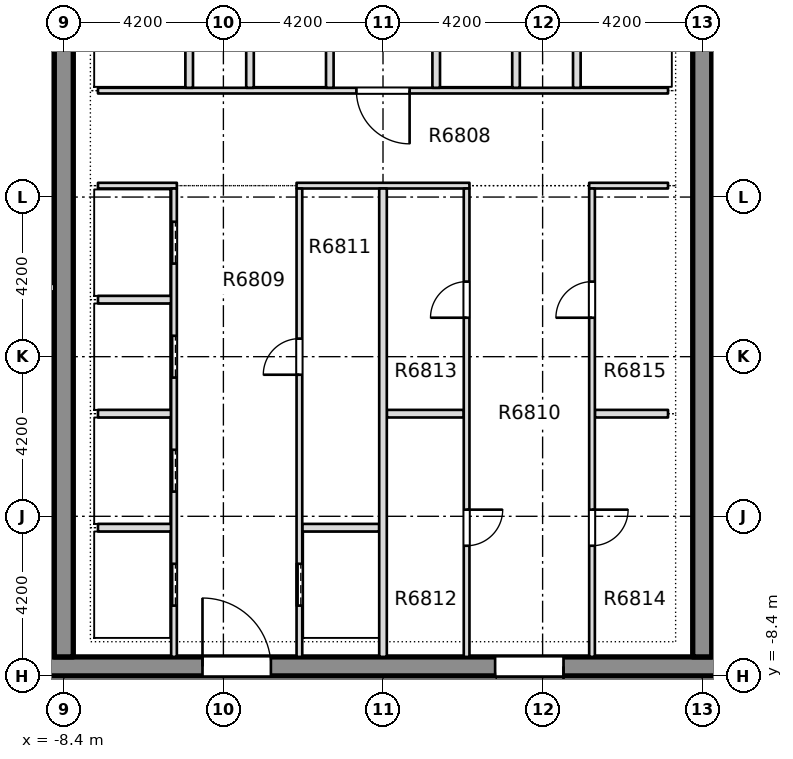
"""IFC4 building model, lengths in metres.
Left out: names, types, materials, properties, quantities, classifications, styles, units other than length and angle.
Written with IfcOpenShell. Run it as: python <this file> out.ifc"""

import sys

from ifc_helpers import new_model, si_unit, direction, frame, frame_2d, origin, place, context, subcontext, project, spatial, rectangle, extrude, element, fill, save


model = new_model("IFC4")
c1 = context("Model", 3, precision=1e-05, world=origin(), true_north=direction((0.0, 1.0)))
c2 = subcontext(c1, "Body", "Model", "MODEL_VIEW")
j1 = project(units=[si_unit("LENGTHUNIT", "METRE"), si_unit("PLANEANGLEUNIT", "RADIAN")], contexts=[c1])
p1 = place(None, origin())
s1 = spatial("IfcSite", under=j1, at=p1, CompositionType="ELEMENT")
p2 = place(p1, origin())
s2 = spatial("IfcBuilding", under=s1, at=p2, CompositionType="ELEMENT")
p3 = place(p2, frame((0.0, 0.0, 257.95)))
s3 = spatial("IfcBuildingStorey", under=s2, at=p3, CompositionType="ELEMENT", Elevation=257.95)
p4 = place(p3, frame((-12.1, -8.15, -0.4), z_axis=(0.0, 0.0, 1.0), x_axis=(1.0, 0.0, 0.0)))
e1 = element("IfcWall", 1, at=p4, inside=s3, PredefinedType="SHEAR", context=c2, shape_type="SweptSolid", body=[
    extrude(rectangle(XDim=24.2, YDim=0.5, at=frame_2d((12.1, 0.0))), origin(), (0.0, 0.0, 1.0), 3.45),
])
p5 = place(p4, frame((7.35, 0.0, 0.4)))
e2 = element("IfcOpeningElement", 2, at=p5, cuts=e1, PredefinedType="OPENING", context=c2, shape_type="SweptSolid", body=[
    extrude(rectangle(XDim=1.8, YDim=2.1, at=frame_2d((0.9, 1.05))), frame((0.0, 0.26, 0.0), z_axis=(0.0, -1.0, 0.0), x_axis=(1.0, 0.0, 0.0)), (0.0, 0.0, 1.0), 0.52),
])
p6 = place(p4, frame((15.05, 0.0, 0.4)))
e3 = element("IfcOpeningElement", 3, at=p6, cuts=e1, PredefinedType="OPENING", context=c2, shape_type="SweptSolid", body=[
    extrude(rectangle(XDim=1.8, YDim=2.1, at=frame_2d((0.9, 1.05))), frame((0.0, 0.26, 0.0), z_axis=(0.0, -1.0, 0.0), x_axis=(1.0, 0.0, 0.0)), (0.0, 0.0, 1.0), 0.52),
])
p7 = place(p3, frame((-8.4, -7.9, -0.4), z_axis=(0.0, 0.0, 1.0), x_axis=(0.0, 1.0, 0.0)))
e4 = element("IfcWall", 4, at=p7, inside=s3, PredefinedType="SHEAR", context=c2, shape_type="SweptSolid", body=[
    extrude(rectangle(XDim=29.15, YDim=0.5, at=frame_2d((14.575, 0.0))), origin(), (0.0, 0.0, 1.0), 3.45),
])
p8 = place(p7, frame((18.8, 0.0, 0.4)))
e5 = element("IfcOpeningElement", 5, at=p8, cuts=e4, PredefinedType="OPENING", context=c2, shape_type="SweptSolid", body=[
    extrude(rectangle(XDim=1.2, YDim=2.1, at=frame_2d((0.6, 1.05))), frame((0.0, 0.26, 0.0), z_axis=(0.0, -1.0, 0.0), x_axis=(1.0, 0.0, 0.0)), (0.0, 0.0, 1.0), 0.52),
])
p9 = place(p3, frame((8.4, -7.9, -0.4), z_axis=(0.0, 0.0, 1.0), x_axis=(0.0, 1.0, 0.0)))
e6 = element("IfcWall", 6, at=p9, inside=s3, PredefinedType="SHEAR", context=c2, shape_type="SweptSolid", body=[
    extrude(rectangle(XDim=29.15, YDim=0.5, at=frame_2d((14.575, 0.0))), origin(), (0.0, 0.0, 1.0), 3.45),
])
p10 = place(p9, frame((18.8, 0.0, 0.4)))
e7 = element("IfcOpeningElement", 7, at=p10, cuts=e6, PredefinedType="OPENING", context=c2, shape_type="SweptSolid", body=[
    extrude(rectangle(XDim=1.2, YDim=2.1, at=frame_2d((0.6, 1.05))), frame((0.0, 0.26, 0.0), z_axis=(0.0, -1.0, 0.0), x_axis=(1.0, 0.0, 0.0)), (0.0, 0.0, 1.0), 0.52),
])
p11 = place(p3, frame((-7.5, -4.5, 0.0), z_axis=(0.0, 0.0, 1.0), x_axis=(1.0, 0.0, 0.0)))
e8 = element("IfcWall", 8, at=p11, inside=s3, PredefinedType="PARTITIONING", context=c2, shape_type="SweptSolid", body=[
    extrude(rectangle(XDim=1.925, YDim=0.2, at=frame_2d((0.962, 0.0))), origin(), (0.0, 0.0, 1.0), 3.05),
])
p12 = place(p3, frame((-2.125, -4.5, 0.0), z_axis=(0.0, 0.0, 1.0), x_axis=(1.0, 0.0, 0.0)))
e9 = element("IfcWall", 9, at=p12, inside=s3, PredefinedType="PARTITIONING", context=c2, shape_type="SweptSolid", body=[
    extrude(rectangle(XDim=2.025, YDim=0.2, at=frame_2d((1.012, 0.0))), origin(), (0.0, 0.0, 1.0), 3.05),
])
p13 = place(p3, frame((-7.5, -1.5, 0.0), z_axis=(0.0, 0.0, 1.0), x_axis=(1.0, 0.0, 0.0)))
e10 = element("IfcWall", 10, at=p13, inside=s3, PredefinedType="PARTITIONING", context=c2, shape_type="SweptSolid", body=[
    extrude(rectangle(XDim=1.925, YDim=0.2, at=frame_2d((0.962, 0.0))), origin(), (0.0, 0.0, 1.0), 3.05),
])
p14 = place(p3, frame((0.1, -1.5, 0.0), z_axis=(0.0, 0.0, 1.0), x_axis=(1.0, 0.0, 0.0)))
e11 = element("IfcWall", 11, at=p14, inside=s3, PredefinedType="PARTITIONING", context=c2, shape_type="SweptSolid", body=[
    extrude(rectangle(XDim=2.025, YDim=0.2, at=frame_2d((1.012, 0.0))), origin(), (0.0, 0.0, 1.0), 3.05),
])
for number, where, z_axis, x_axis in (
    (12, (5.575, -1.5, 0.0), (0.0, 0.0, 1.0), (1.0, 0.0, 0.0)),
    (13, (-7.5, 1.5, 0.0), (0.0, 0.0, 1.0), (1.0, 0.0, 0.0)),
):
    element("IfcWall", number, at=place(p3, frame(where, z_axis=z_axis, x_axis=x_axis)), inside=s3, PredefinedType="PARTITIONING", context=c2, shape_type="SweptSolid", body=[
        extrude(rectangle(XDim=1.925, YDim=0.2, at=frame_2d((0.962, 0.0))), origin(), (0.0, 0.0, 1.0), 3.05),
    ])
p15 = place(p3, frame((-7.5, 4.5, 0.0), z_axis=(0.0, 0.0, 1.0), x_axis=(1.0, 0.0, 0.0)))
e14 = element("IfcWall", 14, at=p15, inside=s3, PredefinedType="PARTITIONING", context=c2, shape_type="SweptSolid", body=[
    extrude(rectangle(XDim=2.075, YDim=0.15, at=frame_2d((1.038, 0.0))), origin(), (0.0, 0.0, 1.0), 3.05),
])
p16 = place(p3, frame((-2.275, 4.5, 0.0), z_axis=(0.0, 0.0, 1.0), x_axis=(1.0, 0.0, 0.0)))
e15 = element("IfcWall", 15, at=p16, inside=s3, PredefinedType="PARTITIONING", context=c2, shape_type="SweptSolid", body=[
    extrude(rectangle(XDim=4.55, YDim=0.15, at=frame_2d((2.275, 0.0))), origin(), (0.0, 0.0, 1.0), 3.05),
])
p17 = place(p3, frame((5.425, 4.5, 0.0), z_axis=(0.0, 0.0, 1.0), x_axis=(1.0, 0.0, 0.0)))
e16 = element("IfcWall", 16, at=p17, inside=s3, PredefinedType="PARTITIONING", context=c2, shape_type="SweptSolid", body=[
    extrude(rectangle(XDim=2.075, YDim=0.15, at=frame_2d((1.038, 0.0))), origin(), (0.0, 0.0, 1.0), 3.05),
])
p18 = place(p3, frame((-7.5, 7.0, 0.0), z_axis=(0.0, 0.0, 1.0), x_axis=(1.0, 0.0, 0.0)))
e17 = element("IfcWall", 17, at=p18, inside=s3, PredefinedType="PARTITIONING", context=c2, shape_type="SweptSolid", body=[
    extrude(rectangle(XDim=15.0, YDim=0.15, at=frame_2d((7.5, 0.0))), origin(), (0.0, 0.0, 1.0), 3.05),
])
p19 = place(p18, frame((6.8, 0.0, 0.0)))
e18 = element("IfcOpeningElement", 18, at=p19, cuts=e17, PredefinedType="OPENING", context=c2, shape_type="SweptSolid", body=[
    extrude(rectangle(XDim=1.4, YDim=2.1, at=frame_2d((0.7, 1.05))), frame((0.0, 0.085, 0.0), z_axis=(0.0, -1.0, 0.0), x_axis=(1.0, 0.0, 0.0)), (0.0, 0.0, 1.0), 0.17),
])
p20 = place(p3, frame((-5.5, -7.899, 0.0), z_axis=(0.0, 0.0, 1.0), x_axis=(0.0, 1.0, 0.0)))
e19 = element("IfcWall", 19, at=p20, inside=s3, PredefinedType="PARTITIONING", context=c2, shape_type="SweptSolid", body=[
    extrude(rectangle(XDim=12.324, YDim=0.15, at=frame_2d((6.162, 0.0))), origin(), (0.0, 0.0, 1.0), 3.05),
])
p21 = place(p20, frame((1.349, 0.0, 0.0)))
e20 = element("IfcOpeningElement", 20, at=p21, cuts=e19, PredefinedType="OPENING", context=c2, shape_type="SweptSolid", body=[
    extrude(rectangle(XDim=1.1, YDim=2.1, at=frame_2d((0.55, 1.05))), frame((0.0, 0.085, 0.0), z_axis=(0.0, -1.0, 0.0), x_axis=(1.0, 0.0, 0.0)), (0.0, 0.0, 1.0), 0.17),
])
p22 = place(p20, frame((4.349, 0.0, 0.0)))
e21 = element("IfcOpeningElement", 21, at=p22, cuts=e19, PredefinedType="OPENING", context=c2, shape_type="SweptSolid", body=[
    extrude(rectangle(XDim=1.1, YDim=2.1, at=frame_2d((0.55, 1.05))), frame((0.0, 0.085, 0.0), z_axis=(0.0, -1.0, 0.0), x_axis=(1.0, 0.0, 0.0)), (0.0, 0.0, 1.0), 0.17),
])
p23 = place(p20, frame((7.349, 0.0, 0.0)))
e22 = element("IfcOpeningElement", 22, at=p23, cuts=e19, PredefinedType="OPENING", context=c2, shape_type="SweptSolid", body=[
    extrude(rectangle(XDim=1.1, YDim=2.1, at=frame_2d((0.55, 1.05))), frame((0.0, 0.085, 0.0), z_axis=(0.0, -1.0, 0.0), x_axis=(1.0, 0.0, 0.0)), (0.0, 0.0, 1.0), 0.17),
])
p24 = place(p20, frame((10.349, 0.0, 0.0)))
e23 = element("IfcOpeningElement", 23, at=p24, cuts=e19, PredefinedType="OPENING", context=c2, shape_type="SweptSolid", body=[
    extrude(rectangle(XDim=1.1, YDim=2.1, at=frame_2d((0.55, 1.05))), frame((0.0, 0.085, 0.0), z_axis=(0.0, -1.0, 0.0), x_axis=(1.0, 0.0, 0.0)), (0.0, 0.0, 1.0), 0.17),
])
p25 = place(p3, frame((-5.1, 7.075, 0.0), z_axis=(0.0, 0.0, 1.0), x_axis=(0.0, 1.0, 0.0)))
e24 = element("IfcWall", 24, at=p25, inside=s3, PredefinedType="PARTITIONING", context=c2, shape_type="SweptSolid", body=[
    extrude(rectangle(XDim=2.725, YDim=0.2, at=frame_2d((1.363, 0.0))), origin(), (0.0, 0.0, 1.0), 3.05),
])
p26 = place(p3, frame((-3.5, 7.075, 0.0), z_axis=(0.0, 0.0, 1.0), x_axis=(0.0, 1.0, 0.0)))
e25 = element("IfcWall", 25, at=p26, inside=s3, PredefinedType="PARTITIONING", context=c2, shape_type="SweptSolid", body=[
    extrude(rectangle(XDim=2.85, YDim=0.2, at=frame_2d((1.425, 0.0))), origin(), (0.0, 0.0, 1.0), 3.05),
])
p27 = place(p3, frame((-2.2, -7.899, 0.0), z_axis=(0.0, 0.0, 1.0), x_axis=(0.0, 1.0, 0.0)))
e26 = element("IfcWall", 26, at=p27, inside=s3, PredefinedType="PARTITIONING", context=c2, shape_type="SweptSolid", body=[
    extrude(rectangle(XDim=12.324, YDim=0.15, at=frame_2d((6.162, 0.0))), origin(), (0.0, 0.0, 1.0), 3.05),
])
p28 = place(p27, frame((1.349, 0.0, 0.0)))
e27 = element("IfcOpeningElement", 27, at=p28, cuts=e26, PredefinedType="OPENING", context=c2, shape_type="SweptSolid", body=[
    extrude(rectangle(XDim=1.1, YDim=2.1, at=frame_2d((0.55, 1.05))), frame((0.0, 0.085, 0.0), z_axis=(0.0, -1.0, 0.0), x_axis=(1.0, 0.0, 0.0)), (0.0, 0.0, 1.0), 0.17),
])
p29 = place(p27, frame((7.424, 0.0, 0.0)))
e28 = element("IfcOpeningElement", 28, at=p29, cuts=e26, PredefinedType="OPENING", context=c2, shape_type="SweptSolid", body=[
    extrude(rectangle(XDim=0.95, YDim=2.1, at=frame_2d((0.475, 1.05))), frame((0.0, 0.085, 0.0), z_axis=(0.0, -1.0, 0.0), x_axis=(1.0, 0.0, 0.0)), (0.0, 0.0, 1.0), 0.17),
])
p30 = place(p3, frame((-1.4, 7.075, 0.0), z_axis=(0.0, 0.0, 1.0), x_axis=(0.0, 1.0, 0.0)))
e29 = element("IfcWall", 29, at=p30, inside=s3, PredefinedType="PARTITIONING", context=c2, shape_type="SweptSolid", body=[
    extrude(rectangle(XDim=2.85, YDim=0.2, at=frame_2d((1.425, 0.0))), origin(), (0.0, 0.0, 1.0), 3.05),
])
p31 = place(p3, frame((0.0, -7.899, 0.0), z_axis=(0.0, 0.0, 1.0), x_axis=(0.0, 1.0, 0.0)))
e30 = element("IfcWall", 30, at=p31, inside=s3, PredefinedType="PARTITIONING", context=c2, shape_type="SweptSolid", body=[
    extrude(rectangle(XDim=12.324, YDim=0.2, at=frame_2d((6.162, 0.0))), origin(), (0.0, 0.0, 1.0), 3.05),
])
p32 = place(p3, frame((1.4, 7.075, 0.0), z_axis=(0.0, 0.0, 1.0), x_axis=(0.0, 1.0, 0.0)))
e31 = element("IfcWall", 31, at=p32, inside=s3, PredefinedType="PARTITIONING", context=c2, shape_type="SweptSolid", body=[
    extrude(rectangle(XDim=2.85, YDim=0.2, at=frame_2d((1.425, 0.0))), origin(), (0.0, 0.0, 1.0), 3.05),
])
p33 = place(p3, frame((2.2, -7.899, 0.0), z_axis=(0.0, 0.0, 1.0), x_axis=(0.0, 1.0, 0.0)))
e32 = element("IfcWall", 32, at=p33, inside=s3, PredefinedType="PARTITIONING", context=c2, shape_type="SweptSolid", body=[
    extrude(rectangle(XDim=12.324, YDim=0.15, at=frame_2d((6.162, 0.0))), origin(), (0.0, 0.0, 1.0), 3.05),
])
p34 = place(p33, frame((2.924, 0.0, 0.0)))
e33 = element("IfcOpeningElement", 33, at=p34, cuts=e32, PredefinedType="OPENING", context=c2, shape_type="SweptSolid", body=[
    extrude(rectangle(XDim=0.95, YDim=2.1, at=frame_2d((0.475, 1.05))), frame((0.0, 0.085, 0.0), z_axis=(0.0, -1.0, 0.0), x_axis=(1.0, 0.0, 0.0)), (0.0, 0.0, 1.0), 0.17),
])
p35 = place(p33, frame((8.924, 0.0, 0.0)))
e34 = element("IfcOpeningElement", 34, at=p35, cuts=e32, PredefinedType="OPENING", context=c2, shape_type="SweptSolid", body=[
    extrude(rectangle(XDim=0.95, YDim=2.1, at=frame_2d((0.475, 1.05))), frame((0.0, 0.085, 0.0), z_axis=(0.0, -1.0, 0.0), x_axis=(1.0, 0.0, 0.0)), (0.0, 0.0, 1.0), 0.17),
])
p36 = place(p3, frame((3.5, 7.075, 0.0), z_axis=(0.0, 0.0, 1.0), x_axis=(0.0, 1.0, 0.0)))
e35 = element("IfcWall", 35, at=p36, inside=s3, PredefinedType="PARTITIONING", context=c2, shape_type="SweptSolid", body=[
    extrude(rectangle(XDim=2.85, YDim=0.2, at=frame_2d((1.425, 0.0))), origin(), (0.0, 0.0, 1.0), 3.05),
])
p37 = place(p3, frame((5.1, 7.075, 0.0), z_axis=(0.0, 0.0, 1.0), x_axis=(0.0, 1.0, 0.0)))
e36 = element("IfcWall", 36, at=p37, inside=s3, PredefinedType="PARTITIONING", context=c2, shape_type="SweptSolid", body=[
    extrude(rectangle(XDim=2.725, YDim=0.2, at=frame_2d((1.363, 0.0))), origin(), (0.0, 0.0, 1.0), 3.05),
])
p38 = place(p3, frame((5.5, -7.899, 0.0), z_axis=(0.0, 0.0, 1.0), x_axis=(0.0, 1.0, 0.0)))
e37 = element("IfcWall", 37, at=p38, inside=s3, PredefinedType="PARTITIONING", context=c2, shape_type="SweptSolid", body=[
    extrude(rectangle(XDim=12.324, YDim=0.15, at=frame_2d((6.162, 0.0))), origin(), (0.0, 0.0, 1.0), 3.05),
])
p39 = place(p38, frame((2.924, 0.0, 0.0)))
e38 = element("IfcOpeningElement", 38, at=p39, cuts=e37, PredefinedType="OPENING", context=c2, shape_type="SweptSolid", body=[
    extrude(rectangle(XDim=0.95, YDim=2.1, at=frame_2d((0.475, 1.05))), frame((0.0, 0.085, 0.0), z_axis=(0.0, -1.0, 0.0), x_axis=(1.0, 0.0, 0.0)), (0.0, 0.0, 1.0), 0.17),
])
p40 = place(p38, frame((8.924, 0.0, 0.0)))
e39 = element("IfcOpeningElement", 39, at=p40, cuts=e37, PredefinedType="OPENING", context=c2, shape_type="SweptSolid", body=[
    extrude(rectangle(XDim=0.95, YDim=2.1, at=frame_2d((0.475, 1.05))), frame((0.0, 0.085, 0.0), z_axis=(0.0, -1.0, 0.0), x_axis=(1.0, 0.0, 0.0)), (0.0, 0.0, 1.0), 0.17),
])
p41 = place(p3, frame((-12.099, 1.816, 0.0), z_axis=(0.0, 0.0, 1.0), x_axis=(1.0, 0.0, 0.0)))
e40 = element("IfcWall", 40, at=p41, inside=s3, PredefinedType="PARTITIONING", context=c2, shape_type="SweptSolid", body=[
    extrude(rectangle(XDim=3.448, YDim=0.2, at=frame_2d((1.724, 0.0))), origin(), (0.0, 0.0, 1.0), 3.05),
])
for number, where, z_axis, x_axis in (
    (41, (8.651, -0.125, 0.0), (0.0, 0.0, 1.0), (1.0, 0.0, 0.0)),
    (42, (8.651, 4.054, 0.0), (0.0, 0.0, 1.0), (1.0, 0.0, 0.0)),
):
    element("IfcWall", number, at=place(p3, frame(where, z_axis=z_axis, x_axis=x_axis)), inside=s3, PredefinedType="PARTITIONING", context=c2, shape_type="SweptSolid", body=[
        extrude(rectangle(XDim=3.448, YDim=0.1, at=frame_2d((1.724, 0.0))), origin(), (0.0, 0.0, 1.0), 3.05),
    ])
p42 = place(p21, origin())
e43 = element("IfcDoor", 43, at=p42, inside=s3, OperationType="SLIDING_TO_LEFT", PredefinedType="DOOR", context=c2, shape_type="SweptSolid", body=[
    extrude(rectangle(XDim=1.1, YDim=2.1, at=frame_2d((0.55, 1.05))), frame((0.0, 0.025, 0.0), z_axis=(0.0, -1.0, 0.0), x_axis=(1.0, 0.0, 0.0)), (0.0, 0.0, 1.0), 0.05),
])
fill(e20, e43)
p43 = place(p22, origin())
e44 = element("IfcDoor", 44, at=p43, inside=s3, OperationType="SLIDING_TO_LEFT", PredefinedType="DOOR", context=c2, shape_type="SweptSolid", body=[
    extrude(rectangle(XDim=1.1, YDim=2.1, at=frame_2d((0.55, 1.05))), frame((0.0, 0.025, 0.0), z_axis=(0.0, -1.0, 0.0), x_axis=(1.0, 0.0, 0.0)), (0.0, 0.0, 1.0), 0.05),
])
fill(e21, e44)
p44 = place(p23, origin())
e45 = element("IfcDoor", 45, at=p44, inside=s3, OperationType="SLIDING_TO_LEFT", PredefinedType="DOOR", context=c2, shape_type="SweptSolid", body=[
    extrude(rectangle(XDim=1.1, YDim=2.1, at=frame_2d((0.55, 1.05))), frame((0.0, 0.025, 0.0), z_axis=(0.0, -1.0, 0.0), x_axis=(1.0, 0.0, 0.0)), (0.0, 0.0, 1.0), 0.05),
])
fill(e22, e45)
p45 = place(p24, origin())
e46 = element("IfcDoor", 46, at=p45, inside=s3, OperationType="SLIDING_TO_LEFT", PredefinedType="DOOR", context=c2, shape_type="SweptSolid", body=[
    extrude(rectangle(XDim=1.1, YDim=2.1, at=frame_2d((0.55, 1.05))), frame((0.0, 0.025, 0.0), z_axis=(0.0, -1.0, 0.0), x_axis=(1.0, 0.0, 0.0)), (0.0, 0.0, 1.0), 0.05),
])
fill(e23, e46)
p46 = place(p28, origin())
e47 = element("IfcDoor", 47, at=p46, inside=s3, OperationType="SLIDING_TO_LEFT", PredefinedType="DOOR", context=c2, shape_type="SweptSolid", body=[
    extrude(rectangle(XDim=1.1, YDim=2.1, at=frame_2d((0.55, 1.05))), frame((0.0, 0.025, 0.0), z_axis=(0.0, -1.0, 0.0), x_axis=(1.0, 0.0, 0.0)), (0.0, 0.0, 1.0), 0.05),
])
fill(e27, e47)
p47 = place(p29, origin())
e48 = element("IfcDoor", 48, at=p47, inside=s3, OperationType="SINGLE_SWING_RIGHT", PredefinedType="DOOR", context=c2, shape_type="SweptSolid", body=[
    extrude(rectangle(XDim=0.95, YDim=2.1, at=frame_2d((0.475, 1.05))), frame((0.0, 0.025, 0.0), z_axis=(0.0, -1.0, 0.0), x_axis=(1.0, 0.0, 0.0)), (0.0, 0.0, 1.0), 0.05),
])
fill(e28, e48)
p48 = place(p34, origin())
e49 = element("IfcDoor", 49, at=p48, inside=s3, OperationType="SINGLE_SWING_RIGHT", PredefinedType="DOOR", context=c2, shape_type="SweptSolid", body=[
    extrude(rectangle(XDim=0.95, YDim=2.1, at=frame_2d((0.475, 1.05))), frame((0.0, 0.025, 0.0), z_axis=(0.0, -1.0, 0.0), x_axis=(1.0, 0.0, 0.0)), (0.0, 0.0, 1.0), 0.05),
])
fill(e33, e49)
p49 = place(p35, origin())
e50 = element("IfcDoor", 50, at=p49, inside=s3, OperationType="SINGLE_SWING_RIGHT", PredefinedType="DOOR", context=c2, shape_type="SweptSolid", body=[
    extrude(rectangle(XDim=0.95, YDim=2.1, at=frame_2d((0.475, 1.05))), frame((0.0, 0.025, 0.0), z_axis=(0.0, -1.0, 0.0), x_axis=(1.0, 0.0, 0.0)), (0.0, 0.0, 1.0), 0.05),
])
fill(e34, e50)
p50 = place(p39, origin())
e51 = element("IfcDoor", 51, at=p50, inside=s3, OperationType="SINGLE_SWING_LEFT", PredefinedType="DOOR", context=c2, shape_type="SweptSolid", body=[
    extrude(rectangle(XDim=0.95, YDim=2.1, at=frame_2d((0.475, 1.05))), frame((0.0, 0.025, 0.0), z_axis=(0.0, -1.0, 0.0), x_axis=(1.0, 0.0, 0.0)), (0.0, 0.0, 1.0), 0.05),
])
fill(e38, e51)
p51 = place(p40, origin())
e52 = element("IfcDoor", 52, at=p51, inside=s3, OperationType="SINGLE_SWING_LEFT", PredefinedType="DOOR", context=c2, shape_type="SweptSolid", body=[
    extrude(rectangle(XDim=0.95, YDim=2.1, at=frame_2d((0.475, 1.05))), frame((0.0, 0.025, 0.0), z_axis=(0.0, -1.0, 0.0), x_axis=(1.0, 0.0, 0.0)), (0.0, 0.0, 1.0), 0.05),
])
fill(e39, e52)
p52 = place(p19, origin())
e53 = element("IfcDoor", 53, at=p52, inside=s3, OperationType="SINGLE_SWING_RIGHT", PredefinedType="DOOR", context=c2, shape_type="SweptSolid", body=[
    extrude(rectangle(XDim=1.4, YDim=2.1, at=frame_2d((0.7, 1.05))), frame((0.0, 0.025, 0.0), z_axis=(0.0, -1.0, 0.0), x_axis=(1.0, 0.0, 0.0)), (0.0, 0.0, 1.0), 0.05),
])
fill(e18, e53)
p53 = place(p5, origin())
e54 = element("IfcDoor", 54, at=p53, inside=s3, OperationType="SINGLE_SWING_LEFT", PredefinedType="DOOR", context=c2, shape_type="SweptSolid", body=[
    extrude(rectangle(XDim=1.8, YDim=2.1, at=frame_2d((0.9, 1.05))), frame((0.0, 0.025, 0.0), z_axis=(0.0, -1.0, 0.0), x_axis=(1.0, 0.0, 0.0)), (0.0, 0.0, 1.0), 0.05),
])
fill(e2, e54)
p54 = place(p6, origin())
e55 = element("IfcDoor", 55, at=p54, inside=s3, OperationType="SINGLE_SWING_LEFT", PredefinedType="DOOR", context=c2, shape_type="SweptSolid", body=[
    extrude(rectangle(XDim=1.8, YDim=2.1, at=frame_2d((0.9, 1.05))), frame((0.0, 0.025, 0.0), z_axis=(0.0, -1.0, 0.0), x_axis=(1.0, 0.0, 0.0)), (0.0, 0.0, 1.0), 0.05),
])
fill(e3, e55)
save(model, sys.argv[1])
